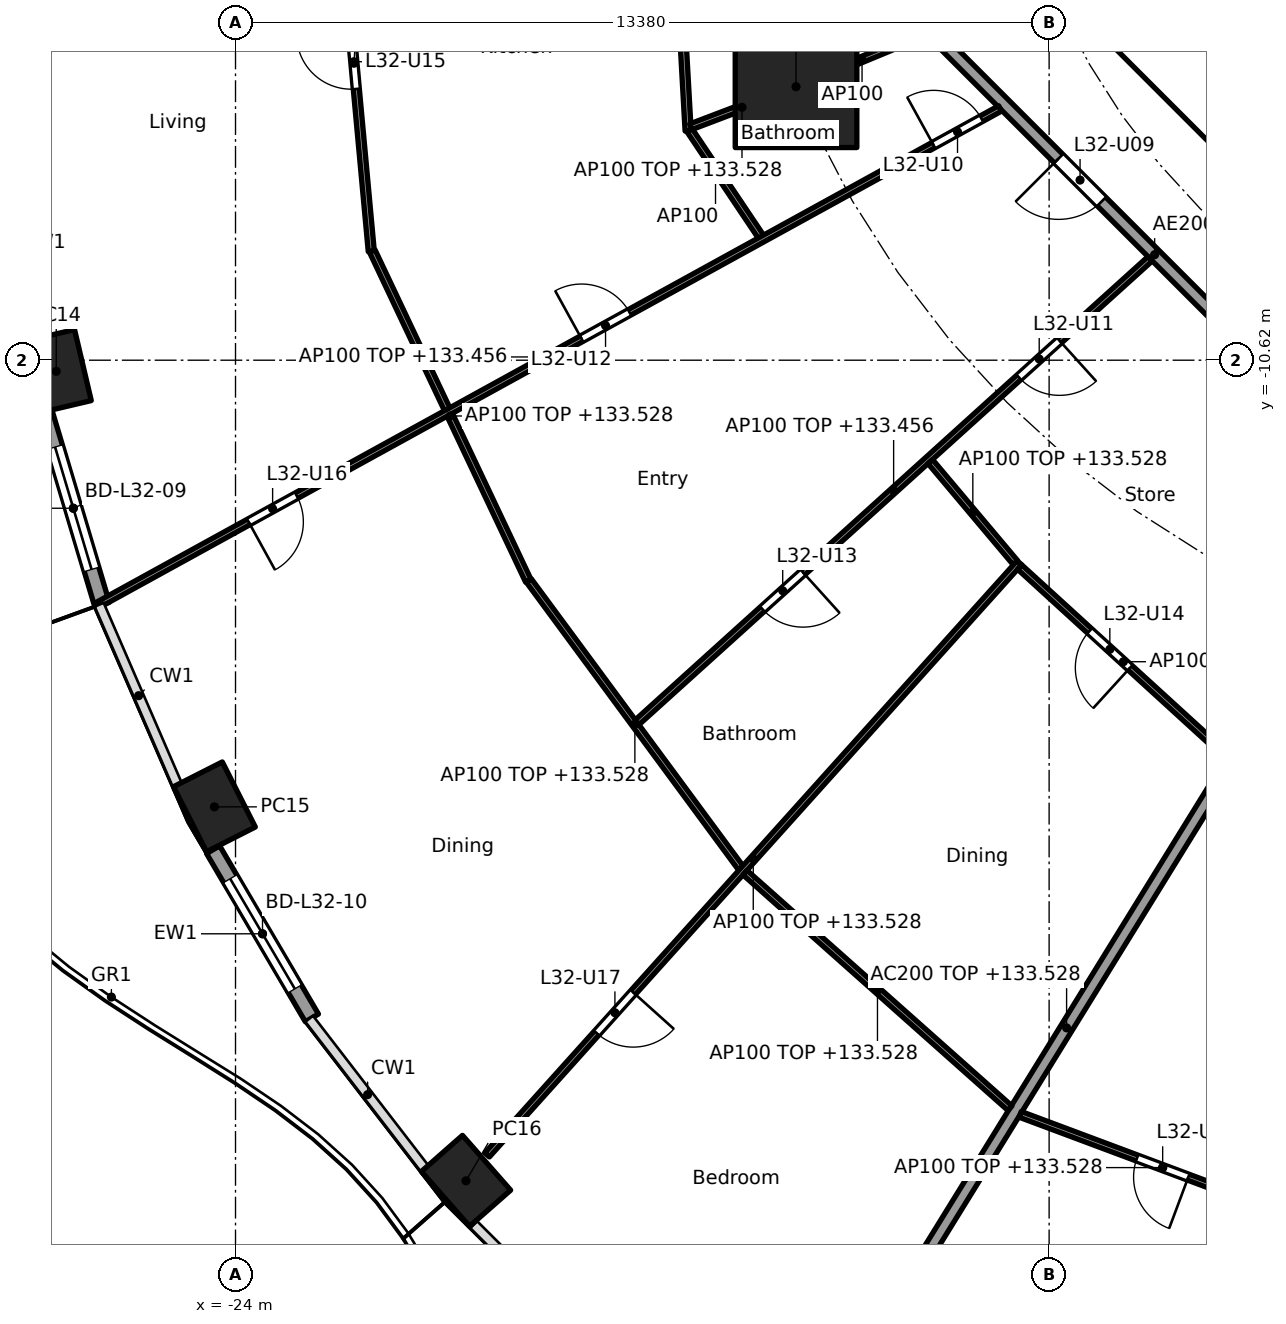
"""IFC4 building model, lengths in metres.
Left out: names, types, materials, properties, quantities, classifications, styles, units other than length and angle.
Written with IfcOpenShell. Run it as: python <this file> out.ifc"""

import sys

from ifc_helpers import new_model, si_unit, direction, frame, frame_2d, origin, origin_2d, place, context, subcontext, project, spatial, rectangle, hollow_rectangle, extrude, element, fill, save


model = new_model("IFC4")
c1 = context("Model", 3, precision=1e-05, world=origin(), true_north=direction((0.0, 1.0)))
c2 = subcontext(c1, "Body", "Model", "MODEL_VIEW")
j1 = project(units=[si_unit("LENGTHUNIT", "METRE"), si_unit("PLANEANGLEUNIT", "RADIAN")], contexts=[c1])
p1 = place(None, origin())
s1 = spatial("IfcSite", under=j1, at=p1, CompositionType="ELEMENT")
p2 = place(p1, origin())
s2 = spatial("IfcBuilding", under=s1, at=p2, CompositionType="ELEMENT")
p3 = place(p2, frame((0.0, 0.0, 130.7)))
s3 = spatial("IfcBuildingStorey", under=s2, at=p3, CompositionType="ELEMENT", Elevation=130.7)
for number, where, z_axis, x_axis in (
    (1, (-26.948, -10.803, 0.0), (0.0, 0.0, 1.0), (0.229, -0.973, 0.0)),
    (2, (-24.347, -17.965, 0.0), (0.0, 0.0, 1.0), (0.452, -0.892, 0.0)),
    (3, (-20.209, -24.115, 0.0), (0.0, 0.0, 1.0), (0.66, -0.751, 0.0)),
):
    element("IfcColumn", number, at=place(p3, frame(where, z_axis=z_axis, x_axis=x_axis)), inside=s3, PredefinedType="COLUMN", context=c2, shape_type="SweptSolid", body=[
        extrude(hollow_rectangle(XDim=1.2, YDim=0.9, WallThickness=0.04, at=origin_2d()), origin(), (0.0, 0.0, 1.0), 3.7),
    ])
p4 = place(p3, frame((-14.782, -6.123, 0.0), z_axis=(0.0, 0.0, 1.0), x_axis=(1.0, 0.0, 0.0)))
e4 = element("IfcColumn", 4, at=p4, inside=s3, PredefinedType="COLUMN", context=c2, shape_type="SweptSolid", body=[
    extrude(rectangle(XDim=2.0, YDim=2.0, at=origin_2d()), origin(), (0.0, 0.0, 1.0), 3.7),
])
p5 = place(p3, frame((-26.195, -14.637, 0.0), z_axis=(0.0, 0.0, 1.0), x_axis=(-0.285889665412, 0.958262541901, 0.0)))
e5 = element("IfcWall", 5, at=p5, inside=s3, PredefinedType="SOLIDWALL", context=c2, shape_type="SweptSolid", body=[
    extrude(rectangle(XDim=3.303, YDim=0.25, at=frame_2d((1.652, 0.0))), origin(), (0.0, 0.0, 1.0), 3.44),
])
p6 = place(p5, frame((0.602, 0.0, 0.0)))
e6 = element("IfcOpeningElement", 6, at=p6, cuts=e5, PredefinedType="OPENING", context=c2, shape_type="SweptSolid", body=[
    extrude(rectangle(XDim=2.1, YDim=2.4, at=frame_2d((1.05, 1.2))), frame((0.0, 0.135, 0.0), z_axis=(0.0, -1.0, 0.0), x_axis=(1.0, 0.0, 0.0)), (0.0, 0.0, 1.0), 0.27),
])
p7 = place(p3, frame((-22.744, -21.436, 0.0), z_axis=(0.0, 0.0, 1.0), x_axis=(-0.506314982873, 0.862348617508, 0.0)))
e7 = element("IfcWall", 7, at=p7, inside=s3, PredefinedType="SOLIDWALL", context=c2, shape_type="SweptSolid", body=[
    extrude(rectangle(XDim=3.208, YDim=0.25, at=frame_2d((1.604, 0.0))), origin(), (0.0, 0.0, 1.0), 3.44),
])
p8 = place(p7, frame((0.554, 0.0, 0.0)))
e8 = element("IfcOpeningElement", 8, at=p8, cuts=e7, PredefinedType="OPENING", context=c2, shape_type="SweptSolid", body=[
    extrude(rectangle(XDim=2.1, YDim=2.4, at=frame_2d((1.05, 1.2))), frame((0.0, 0.135, 0.0), z_axis=(0.0, -1.0, 0.0), x_axis=(1.0, 0.0, 0.0)), (0.0, 0.0, 1.0), 0.27),
])
p9 = place(p3, frame((-9.988, -4.613, 0.0), z_axis=(0.0, 0.0, 1.0), x_axis=(0.707106781187, -0.707106781187, 0.0)))
e9 = element("IfcWall", 9, at=p9, inside=s3, PredefinedType="SHEAR", context=c2, shape_type="SweptSolid", body=[
    extrude(rectangle(XDim=7.602, YDim=0.6, at=frame_2d((3.801, 0.0))), origin(), (0.0, 0.0, 1.0), 3.44),
])
p10 = place(p9, frame((6.151, 0.0, 0.0)))
e10 = element("IfcOpeningElement", 10, at=p10, cuts=e9, PredefinedType="OPENING", context=c2, shape_type="SweptSolid", body=[
    extrude(rectangle(XDim=1.1, YDim=2.1, at=frame_2d((0.55, 1.05))), frame((0.0, 0.31, 0.0), z_axis=(0.0, -1.0, 0.0), x_axis=(1.0, 0.0, 0.0)), (0.0, 0.0, 1.0), 0.62),
])
p11 = place(p3, frame((-8.301, -5.8, 0.0), z_axis=(0.0, 0.0, 1.0), x_axis=(1.0, 0.0, 0.0)))
e11 = element("IfcWall", 11, at=p11, inside=s3, PredefinedType="PARTITIONING", context=c2, shape_type="SweptSolid", body=[
    extrude(rectangle(XDim=2.026, YDim=0.15, at=frame_2d((1.013, 0.0))), origin(), (0.0, 0.0, 1.0), 3.44),
])
p12 = place(p3, frame((-6.149, -14.825, 0.0), z_axis=(0.0, 0.0, 1.0), x_axis=(-0.525406383516, -0.85085141603, 0.0)))
e12 = element("IfcWall", 12, at=p12, inside=s3, PredefinedType="PARTITIONING", context=c2, shape_type="SweptSolid", body=[
    extrude(rectangle(XDim=15.925, YDim=0.2, at=frame_2d((7.962, 0.0))), origin(), (0.0, 0.0, 1.0), 2.828),
])
p13 = place(p3, frame((-12.635, -5.134, 0.0), z_axis=(0.0, 0.0, 1.0), x_axis=(0.707106781187, -0.707106781187, 0.0)))
e13 = element("IfcWall", 13, at=p13, inside=s3, PredefinedType="PARTITIONING", context=c2, shape_type="SweptSolid", body=[
    extrude(rectangle(XDim=10.609, YDim=0.2, at=frame_2d((5.305, 0.0))), origin(), (0.0, 0.0, 1.0), 3.44),
])
p14 = place(p13, frame((3.07, 0.0, 0.0)))
e14 = element("IfcOpeningElement", 14, at=p14, cuts=e13, PredefinedType="OPENING", context=c2, shape_type="SweptSolid", body=[
    extrude(rectangle(XDim=1.0, YDim=2.1, at=frame_2d((0.5, 1.05))), frame((0.0, 0.11, 0.0), z_axis=(0.0, -1.0, 0.0), x_axis=(1.0, 0.0, 0.0)), (0.0, 0.0, 1.0), 0.22),
])
p15 = place(p3, frame((-16.82, -2.158, 0.0), z_axis=(0.0, 0.0, 1.0), x_axis=(0.055967931845, -0.998432566879, 0.0)))
e15 = element("IfcWall", 15, at=p15, inside=s3, PredefinedType="PARTITIONING", context=c2, shape_type="SweptSolid", body=[
    extrude(rectangle(XDim=4.698, YDim=0.1, at=frame_2d((2.349, 0.0))), origin(), (0.0, 0.0, 1.0), 2.828),
])
p16 = place(p15, frame((1.874, 0.0, 0.0)))
e16 = element("IfcOpeningElement", 16, at=p16, cuts=e15, PredefinedType="OPENING", context=c2, shape_type="SweptSolid", body=[
    extrude(rectangle(XDim=0.9, YDim=2.1, at=frame_2d((0.45, 1.05))), frame((0.0, 0.06, 0.0), z_axis=(0.0, -1.0, 0.0), x_axis=(1.0, 0.0, 0.0)), (0.0, 0.0, 1.0), 0.12),
])
p17 = place(p3, frame((-22.338, -2.642, 0.0), z_axis=(0.0, 0.0, 1.0), x_axis=(0.091768304523, -0.995780386574, 0.0)))
e17 = element("IfcWall", 17, at=p17, inside=s3, PredefinedType="PARTITIONING", context=c2, shape_type="SweptSolid", body=[
    extrude(rectangle(XDim=6.215, YDim=0.1, at=frame_2d((3.107, 0.0))), origin(), (0.0, 0.0, 1.0), 2.828),
])
p18 = place(p17, frame((2.632, 0.0, 0.0)))
e18 = element("IfcOpeningElement", 18, at=p18, cuts=e17, PredefinedType="OPENING", context=c2, shape_type="SweptSolid", body=[
    extrude(rectangle(XDim=0.9, YDim=2.1, at=frame_2d((0.45, 1.05))), frame((0.0, 0.06, 0.0), z_axis=(0.0, -1.0, 0.0), x_axis=(1.0, 0.0, 0.0)), (0.0, 0.0, 1.0), 0.12),
])
p19 = place(p3, frame((-12.657, -5.243, 0.0), z_axis=(0.0, 0.0, 1.0), x_axis=(-0.923864733477, -0.382719158442, 0.0)))
e19 = element("IfcWall", 19, at=p19, inside=s3, PredefinedType="PARTITIONING", context=c2, shape_type="SweptSolid", body=[
    extrude(rectangle(XDim=2.25, YDim=0.1, at=frame_2d((1.125, 0.0))), origin(), (0.0, 0.0, 1.0), 3.44),
])
p20 = place(p3, frame((-14.829, -6.141, 0.0), z_axis=(0.0, 0.0, 1.0), x_axis=(-0.934704367514, -0.355426146128, 0.0)))
e20 = element("IfcWall", 20, at=p20, inside=s3, PredefinedType="PARTITIONING", context=c2, shape_type="SweptSolid", body=[
    extrude(rectangle(XDim=1.802, YDim=0.1, at=frame_2d((0.901, 0.0))), origin(), (0.0, 0.0, 1.0), 2.828),
])
p21 = place(p3, frame((-16.532, -6.84, 0.0), z_axis=(0.0, 0.0, 1.0), x_axis=(0.556994773624, -0.830515997531, 0.0)))
e21 = element("IfcWall", 21, at=p21, inside=s3, PredefinedType="PARTITIONING", context=c2, shape_type="SweptSolid", body=[
    extrude(rectangle(XDim=2.183, YDim=0.1, at=frame_2d((1.092, 0.0))), origin(), (0.0, 0.0, 1.0), 3.44),
])
p22 = place(p3, frame((-21.75, -8.826, 0.0), z_axis=(0.0, 0.0, 1.0), x_axis=(0.427736419988, -0.903903509793, 0.0)))
e22 = element("IfcWall", 22, at=p22, inside=s3, PredefinedType="PARTITIONING", context=c2, shape_type="SweptSolid", body=[
    extrude(rectangle(XDim=5.999, YDim=0.1, at=frame_2d((3.0, 0.0))), origin(), (0.0, 0.0, 1.0), 2.828),
])
p23 = place(p3, frame((-11.426, -6.479, 0.0), z_axis=(0.0, 0.0, 1.0), x_axis=(-0.876110392495, -0.482110547657, 0.0)))
e23 = element("IfcWall", 23, at=p23, inside=s3, PredefinedType="PARTITIONING", context=c2, shape_type="SweptSolid", body=[
    extrude(rectangle(XDim=16.955, YDim=0.1, at=frame_2d((8.478, 0.0))), origin(), (0.0, 0.0, 1.0), 2.756),
])
p24 = place(p23, frame((0.35, 0.0, 0.0)))
e24 = element("IfcOpeningElement", 24, at=p24, cuts=e23, PredefinedType="OPENING", context=c2, shape_type="SweptSolid", body=[
    extrude(rectangle(XDim=0.9, YDim=2.1, at=frame_2d((0.45, 1.05))), frame((0.0, 0.06, 0.0), z_axis=(0.0, -1.0, 0.0), x_axis=(1.0, 0.0, 0.0)), (0.0, 0.0, 1.0), 0.12),
])
p25 = place(p23, frame((6.957, 0.0, 0.0)))
e25 = element("IfcOpeningElement", 25, at=p25, cuts=e23, PredefinedType="OPENING", context=c2, shape_type="SweptSolid", body=[
    extrude(rectangle(XDim=0.9, YDim=2.1, at=frame_2d((0.45, 1.05))), frame((0.0, 0.06, 0.0), z_axis=(0.0, -1.0, 0.0), x_axis=(1.0, 0.0, 0.0)), (0.0, 0.0, 1.0), 0.12),
])
p26 = place(p23, frame((13.206, 0.0, 0.0)))
e26 = element("IfcOpeningElement", 26, at=p26, cuts=e23, PredefinedType="OPENING", context=c2, shape_type="SweptSolid", body=[
    extrude(rectangle(XDim=0.9, YDim=2.1, at=frame_2d((0.45, 1.05))), frame((0.0, 0.06, 0.0), z_axis=(0.0, -1.0, 0.0), x_axis=(1.0, 0.0, 0.0)), (0.0, 0.0, 1.0), 0.12),
])
p27 = place(p3, frame((-19.176, -14.244, 0.0), z_axis=(0.0, 0.0, 1.0), x_axis=(0.593532053206, -0.80481035146, 0.0)))
e27 = element("IfcWall", 27, at=p27, inside=s3, PredefinedType="PARTITIONING", context=c2, shape_type="SweptSolid", body=[
    extrude(rectangle(XDim=5.876, YDim=0.1, at=frame_2d((2.938, 0.0))), origin(), (0.0, 0.0, 1.0), 2.828),
])
p28 = place(p3, frame((-8.959, -8.952, 0.0), z_axis=(0.0, 0.0, 1.0), x_axis=(-0.741982736283, -0.670418987692, 0.0)))
e28 = element("IfcWall", 28, at=p28, inside=s3, PredefinedType="PARTITIONING", context=c2, shape_type="SweptSolid", body=[
    extrude(rectangle(XDim=11.371, YDim=0.1, at=frame_2d((5.685, 0.0))), origin(), (0.0, 0.0, 1.0), 2.756),
])
p29 = place(p28, frame((2.009, 0.0, 0.0)))
e29 = element("IfcOpeningElement", 29, at=p29, cuts=e28, PredefinedType="OPENING", context=c2, shape_type="SweptSolid", body=[
    extrude(rectangle(XDim=0.9, YDim=2.1, at=frame_2d((0.45, 1.05))), frame((0.0, 0.06, 0.0), z_axis=(0.0, -1.0, 0.0), x_axis=(1.0, 0.0, 0.0)), (0.0, 0.0, 1.0), 0.12),
])
p30 = place(p28, frame((7.694, 0.0, 0.0)))
e30 = element("IfcOpeningElement", 30, at=p30, cuts=e28, PredefinedType="OPENING", context=c2, shape_type="SweptSolid", body=[
    extrude(rectangle(XDim=0.9, YDim=2.1, at=frame_2d((0.45, 1.05))), frame((0.0, 0.06, 0.0), z_axis=(0.0, -1.0, 0.0), x_axis=(1.0, 0.0, 0.0)), (0.0, 0.0, 1.0), 0.12),
])
p31 = place(p3, frame((-12.575, -12.286, 0.0), z_axis=(0.0, 0.0, 1.0), x_axis=(0.644052758448, -0.764981074495, 0.0)))
e31 = element("IfcWall", 31, at=p31, inside=s3, PredefinedType="PARTITIONING", context=c2, shape_type="SweptSolid", body=[
    extrude(rectangle(XDim=2.174, YDim=0.1, at=frame_2d((1.087, 0.0))), origin(), (0.0, 0.0, 1.0), 2.828),
])
p32 = place(p3, frame((-11.109, -13.951, 0.0), z_axis=(0.0, 0.0, 1.0), x_axis=(-0.668488676691, -0.743722319913, 0.0)))
e32 = element("IfcWall", 32, at=p32, inside=s3, PredefinedType="PARTITIONING", context=c2, shape_type="SweptSolid", body=[
    extrude(rectangle(XDim=13.094, YDim=0.1, at=frame_2d((6.547, 0.0))), origin(), (0.0, 0.0, 1.0), 2.828),
])
p33 = place(p32, frame((9.5, 0.0, 0.0)))
e33 = element("IfcOpeningElement", 33, at=p33, cuts=e32, PredefinedType="OPENING", context=c2, shape_type="SweptSolid", body=[
    extrude(rectangle(XDim=0.9, YDim=2.1, at=frame_2d((0.45, 1.05))), frame((0.0, 0.06, 0.0), z_axis=(0.0, -1.0, 0.0), x_axis=(1.0, 0.0, 0.0)), (0.0, 0.0, 1.0), 0.12),
])
p34 = place(p3, frame((-11.105, -14.021, 0.0), z_axis=(0.0, 0.0, 1.0), x_axis=(0.738880014758, -0.673837015747, 0.0)))
e34 = element("IfcWall", 34, at=p34, inside=s3, PredefinedType="PARTITIONING", context=c2, shape_type="SweptSolid", body=[
    extrude(rectangle(XDim=4.621, YDim=0.1, at=frame_2d((2.31, 0.0))), origin(), (0.0, 0.0, 1.0), 2.828),
])
p35 = place(p34, frame((1.558, 0.0, 0.0)))
e35 = element("IfcOpeningElement", 35, at=p35, cuts=e34, PredefinedType="OPENING", context=c2, shape_type="SweptSolid", body=[
    extrude(rectangle(XDim=0.9, YDim=2.1, at=frame_2d((0.45, 1.05))), frame((0.0, 0.06, 0.0), z_axis=(0.0, -1.0, 0.0), x_axis=(1.0, 0.0, 0.0)), (0.0, 0.0, 1.0), 0.12),
])
p36 = place(p3, frame((-15.622, -19.046, 0.0), z_axis=(0.0, 0.0, 1.0), x_axis=(0.747342322463, -0.664439201925, 0.0)))
e36 = element("IfcWall", 36, at=p36, inside=s3, PredefinedType="PARTITIONING", context=c2, shape_type="SweptSolid", body=[
    extrude(rectangle(XDim=5.831, YDim=0.1, at=frame_2d((2.916, 0.0))), origin(), (0.0, 0.0, 1.0), 2.828),
])
p37 = place(p3, frame((-11.096, -23.022, 0.0), z_axis=(0.0, 0.0, 1.0), x_axis=(0.936725688471, -0.350064257758, 0.0)))
e37 = element("IfcWall", 37, at=p37, inside=s3, PredefinedType="PARTITIONING", context=c2, shape_type="SweptSolid", body=[
    extrude(rectangle(XDim=5.003, YDim=0.1, at=frame_2d((2.501, 0.0))), origin(), (0.0, 0.0, 1.0), 2.828),
])
p38 = place(p37, frame((2.051, 0.0, 0.0)))
e38 = element("IfcOpeningElement", 38, at=p38, cuts=e37, PredefinedType="OPENING", context=c2, shape_type="SweptSolid", body=[
    extrude(rectangle(XDim=0.9, YDim=2.1, at=frame_2d((0.45, 1.05))), frame((0.0, 0.06, 0.0), z_axis=(0.0, -1.0, 0.0), x_axis=(1.0, 0.0, 0.0)), (0.0, 0.0, 1.0), 0.12),
])
p39 = place(p6, origin())
e39 = element("IfcDoor", 39, at=p39, inside=s3, OperationType="SLIDING_TO_LEFT", PredefinedType="DOOR", context=c2, shape_type="SweptSolid", body=[
    extrude(rectangle(XDim=2.1, YDim=2.4, at=frame_2d((1.05, 1.2))), frame((0.0, 0.025, 0.0), z_axis=(0.0, -1.0, 0.0), x_axis=(1.0, 0.0, 0.0)), (0.0, 0.0, 1.0), 0.05),
])
fill(e6, e39)
p40 = place(p8, origin())
e40 = element("IfcDoor", 40, at=p40, inside=s3, OperationType="SLIDING_TO_LEFT", PredefinedType="DOOR", context=c2, shape_type="SweptSolid", body=[
    extrude(rectangle(XDim=2.1, YDim=2.4, at=frame_2d((1.05, 1.2))), frame((0.0, 0.025, 0.0), z_axis=(0.0, -1.0, 0.0), x_axis=(1.0, 0.0, 0.0)), (0.0, 0.0, 1.0), 0.05),
])
fill(e8, e40)
p41 = place(p14, frame((1.0, 0.0, 0.0), x_axis=(-1.0, 0.0, 0.0)))
e41 = element("IfcDoor", 41, at=p41, inside=s3, OperationType="SINGLE_SWING_RIGHT", PredefinedType="DOOR", context=c2, shape_type="SweptSolid", body=[
    extrude(rectangle(XDim=1.0, YDim=2.1, at=frame_2d((0.5, 1.05))), frame((0.0, 0.025, 0.0), z_axis=(0.0, -1.0, 0.0), x_axis=(1.0, 0.0, 0.0)), (0.0, 0.0, 1.0), 0.05),
])
fill(e14, e41)
p42 = place(p24, frame((0.9, 0.0, 0.0), x_axis=(-1.0, 0.0, 0.0)))
e42 = element("IfcDoor", 42, at=p42, inside=s3, OperationType="SINGLE_SWING_LEFT", PredefinedType="DOOR", context=c2, shape_type="SweptSolid", body=[
    extrude(rectangle(XDim=0.9, YDim=2.1, at=frame_2d((0.45, 1.05))), frame((0.0, 0.025, 0.0), z_axis=(0.0, -1.0, 0.0), x_axis=(1.0, 0.0, 0.0)), (0.0, 0.0, 1.0), 0.05),
])
fill(e24, e42)
p43 = place(p29, origin())
e43 = element("IfcDoor", 43, at=p43, inside=s3, OperationType="SINGLE_SWING_LEFT", PredefinedType="DOOR", context=c2, shape_type="SweptSolid", body=[
    extrude(rectangle(XDim=0.9, YDim=2.1, at=frame_2d((0.45, 1.05))), frame((0.0, 0.025, 0.0), z_axis=(0.0, -1.0, 0.0), x_axis=(1.0, 0.0, 0.0)), (0.0, 0.0, 1.0), 0.05),
])
fill(e29, e43)
p44 = place(p25, frame((0.9, 0.0, 0.0), x_axis=(-1.0, 0.0, 0.0)))
e44 = element("IfcDoor", 44, at=p44, inside=s3, OperationType="SINGLE_SWING_LEFT", PredefinedType="DOOR", context=c2, shape_type="SweptSolid", body=[
    extrude(rectangle(XDim=0.9, YDim=2.1, at=frame_2d((0.45, 1.05))), frame((0.0, 0.025, 0.0), z_axis=(0.0, -1.0, 0.0), x_axis=(1.0, 0.0, 0.0)), (0.0, 0.0, 1.0), 0.05),
])
fill(e25, e44)
p45 = place(p30, origin())
e45 = element("IfcDoor", 45, at=p45, inside=s3, OperationType="SINGLE_SWING_LEFT", PredefinedType="DOOR", context=c2, shape_type="SweptSolid", body=[
    extrude(rectangle(XDim=0.9, YDim=2.1, at=frame_2d((0.45, 1.05))), frame((0.0, 0.025, 0.0), z_axis=(0.0, -1.0, 0.0), x_axis=(1.0, 0.0, 0.0)), (0.0, 0.0, 1.0), 0.05),
])
fill(e30, e45)
p46 = place(p35, frame((0.9, 0.0, 0.0), x_axis=(-1.0, 0.0, 0.0)))
e46 = element("IfcDoor", 46, at=p46, inside=s3, OperationType="SINGLE_SWING_LEFT", PredefinedType="DOOR", context=c2, shape_type="SweptSolid", body=[
    extrude(rectangle(XDim=0.9, YDim=2.1, at=frame_2d((0.45, 1.05))), frame((0.0, 0.025, 0.0), z_axis=(0.0, -1.0, 0.0), x_axis=(1.0, 0.0, 0.0)), (0.0, 0.0, 1.0), 0.05),
])
fill(e35, e46)
p47 = place(p18, frame((0.9, 0.0, 0.0), x_axis=(-1.0, 0.0, 0.0)))
e47 = element("IfcDoor", 47, at=p47, inside=s3, OperationType="SINGLE_SWING_RIGHT", PredefinedType="DOOR", context=c2, shape_type="SweptSolid", body=[
    extrude(rectangle(XDim=0.9, YDim=2.1, at=frame_2d((0.45, 1.05))), frame((0.0, 0.025, 0.0), z_axis=(0.0, -1.0, 0.0), x_axis=(1.0, 0.0, 0.0)), (0.0, 0.0, 1.0), 0.05),
])
fill(e18, e47)
p48 = place(p26, origin())
e48 = element("IfcDoor", 48, at=p48, inside=s3, OperationType="SINGLE_SWING_RIGHT", PredefinedType="DOOR", context=c2, shape_type="SweptSolid", body=[
    extrude(rectangle(XDim=0.9, YDim=2.1, at=frame_2d((0.45, 1.05))), frame((0.0, 0.025, 0.0), z_axis=(0.0, -1.0, 0.0), x_axis=(1.0, 0.0, 0.0)), (0.0, 0.0, 1.0), 0.05),
])
fill(e26, e48)
p49 = place(p33, origin())
e49 = element("IfcDoor", 49, at=p49, inside=s3, OperationType="SINGLE_SWING_LEFT", PredefinedType="DOOR", context=c2, shape_type="SweptSolid", body=[
    extrude(rectangle(XDim=0.9, YDim=2.1, at=frame_2d((0.45, 1.05))), frame((0.0, 0.025, 0.0), z_axis=(0.0, -1.0, 0.0), x_axis=(1.0, 0.0, 0.0)), (0.0, 0.0, 1.0), 0.05),
])
fill(e33, e49)
p50 = place(p38, frame((0.9, 0.0, 0.0), x_axis=(-1.0, 0.0, 0.0)))
e50 = element("IfcDoor", 50, at=p50, inside=s3, OperationType="SINGLE_SWING_LEFT", PredefinedType="DOOR", context=c2, shape_type="SweptSolid", body=[
    extrude(rectangle(XDim=0.9, YDim=2.1, at=frame_2d((0.45, 1.05))), frame((0.0, 0.025, 0.0), z_axis=(0.0, -1.0, 0.0), x_axis=(1.0, 0.0, 0.0)), (0.0, 0.0, 1.0), 0.05),
])
fill(e38, e50)
save(model, sys.argv[1])
